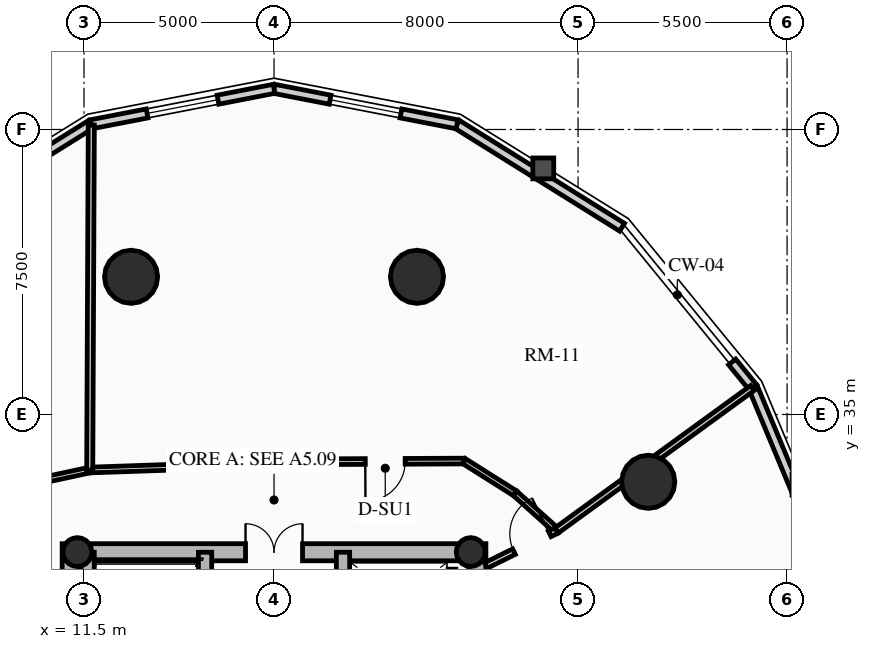
"""IFC4 building model, lengths in metres.
Left out: names, types, materials, properties, quantities, classifications, styles, units other than length and angle.
Written with IfcOpenShell. Run it as: python <this file> out.ifc"""

import sys

from ifc_helpers import new_model, si_unit, direction, frame, frame_2d, origin, origin_2d, place, context, subcontext, project, spatial, rectangle, circle, hollow_circle, extrude, source, transform, mapped, element, fill, save


model = new_model("IFC4")
c1 = context("Model", 3, precision=1e-05, world=origin(), true_north=direction((0.0, 1.0)))
c2 = subcontext(c1, "Body", "Model", "MODEL_VIEW")
j1 = project(units=[si_unit("LENGTHUNIT", "METRE"), si_unit("PLANEANGLEUNIT", "RADIAN")], contexts=[c1])
p1 = place(None, origin())
s1 = spatial("IfcSite", under=j1, at=p1, CompositionType="ELEMENT")
p2 = place(p1, origin())
s2 = spatial("IfcBuilding", under=s1, at=p2, CompositionType="ELEMENT")
p3 = place(p2, frame((0.0, 0.0, 132.88)))
s3 = spatial("IfcBuildingStorey", under=s2, at=p3, CompositionType="ELEMENT", Elevation=132.88)
for number, where, z_axis, x_axis in (
    (1, (11.15, 17.4, 0.0), (0.0, 0.0, 1.0), (0.0, 1.0, 0.0)),
    (2, (21.85, 17.4, 0.0), (0.0, 0.0, 1.0), (0.0, 1.0, 0.0)),
):
    element("IfcWall", number, at=place(p3, frame(where, z_axis=z_axis, x_axis=x_axis)), inside=s3, PredefinedType="SHEAR", context=c2, shape_type="SweptSolid", body=[
        extrude(rectangle(XDim=14.2, YDim=0.45, at=frame_2d((7.1, 0.0))), origin(), (0.0, 0.0, 1.0), 3.72),
    ])
p4 = place(p3, frame((11.15, 31.375, 0.0), z_axis=(0.0, 0.0, 1.0), x_axis=(1.0, 0.0, 0.0)))
e3 = element("IfcWall", 3, at=p4, inside=s3, PredefinedType="SHEAR", context=c2, shape_type="SweptSolid", body=[
    extrude(rectangle(XDim=10.7, YDim=0.45, at=frame_2d((5.35, 0.0))), origin(), (0.0, 0.0, 1.0), 3.72),
])
m1 = source(origin(), c2, "Body", "SweptSolid", [
    extrude(rectangle(XDim=1.5, YDim=2.02, at=frame_2d((0.75, 1.01))), frame((0.0, 0.235, 0.0), z_axis=(0.0, -1.0, 0.0), x_axis=(1.0, 0.0, 0.0)), (0.0, 0.0, 1.0), 0.47),
])
p5 = place(p4, frame((4.6, 0.0, 0.0)))
e4 = element("IfcOpeningElement", 4, at=p5, cuts=e3, PredefinedType="OPENING", context=c2, shape_type="MappedRepresentation", body=[
    mapped(m1, transform((0.0, 0.0, 0.0), x_axis=(1.0, 0.0, 0.0), y_axis=(0.0, 1.0, 0.0), z_axis=(0.0, 0.0, 1.0), scale=1.0)),
])
p6 = place(p3, frame((14.685, 17.625, 0.0), z_axis=(0.0, 0.0, 1.0), x_axis=(0.0, 1.0, 0.0)))
e5 = element("IfcWall", 5, at=p6, inside=s3, PredefinedType="SHEAR", context=c2, shape_type="SweptSolid", body=[
    extrude(rectangle(XDim=13.75, YDim=0.35, at=frame_2d((6.875, 0.0))), origin(), (0.0, 0.0, 1.0), 3.72),
])
m2 = source(origin(), c2, "Body", "SweptSolid", [
    extrude(rectangle(XDim=1.1, YDim=2.015, at=frame_2d((0.55, 1.007))), frame((0.0, 0.185, 0.0), z_axis=(0.0, -1.0, 0.0), x_axis=(1.0, 0.0, 0.0)), (0.0, 0.0, 1.0), 0.37),
])
p7 = place(p6, frame((4.875, 0.0, 0.0)))
e6 = element("IfcOpeningElement", 6, at=p7, cuts=e5, PredefinedType="OPENING", context=c2, shape_type="MappedRepresentation", body=[
    mapped(m2, transform((0.0, 0.0, 0.0), x_axis=(1.0, 0.0, 0.0), y_axis=(0.0, 1.0, 0.0), z_axis=(0.0, 0.0, 1.0), scale=1.0)),
])
p8 = place(p6, frame((0.65, 0.0, 0.0)))
e7 = element("IfcOpeningElement", 7, at=p8, cuts=e5, PredefinedType="OPENING", context=c2, shape_type="MappedRepresentation", body=[
    mapped(m2, transform((0.0, 0.0, 0.0), x_axis=(1.0, 0.0, 0.0), y_axis=(0.0, 1.0, 0.0), z_axis=(0.0, 0.0, 1.0), scale=1.0)),
])
p9 = place(p6, frame((2.65, 0.0, 0.0)))
e8 = element("IfcOpeningElement", 8, at=p9, cuts=e5, PredefinedType="OPENING", context=c2, shape_type="MappedRepresentation", body=[
    mapped(m2, transform((0.0, 0.0, 0.0), x_axis=(1.0, 0.0, 0.0), y_axis=(0.0, 1.0, 0.0), z_axis=(0.0, 0.0, 1.0), scale=1.0)),
])
m3 = source(origin(), c2, "Body", "SweptSolid", [
    extrude(rectangle(XDim=1.15, YDim=2.02, at=frame_2d((0.575, 1.01))), frame((0.0, 0.185, 0.0), z_axis=(0.0, -1.0, 0.0), x_axis=(1.0, 0.0, 0.0)), (0.0, 0.0, 1.0), 0.37),
])
p10 = place(p6, frame((7.295, 0.0, 0.0)))
e9 = element("IfcOpeningElement", 9, at=p10, cuts=e5, PredefinedType="OPENING", context=c2, shape_type="MappedRepresentation", body=[
    mapped(m3, transform((0.0, 0.0, 0.0), x_axis=(1.0, 0.0, 0.0), y_axis=(0.0, 1.0, 0.0), z_axis=(0.0, 0.0, 1.0), scale=1.0)),
])
p11 = place(p3, frame((18.315, 17.625, 0.0), z_axis=(0.0, 0.0, 1.0), x_axis=(0.0, 1.0, 0.0)))
e10 = element("IfcWall", 10, at=p11, inside=s3, PredefinedType="SHEAR", context=c2, shape_type="SweptSolid", body=[
    extrude(rectangle(XDim=13.75, YDim=0.35, at=frame_2d((6.875, 0.0))), origin(), (0.0, 0.0, 1.0), 3.72),
])
p12 = place(p11, frame((5.305, 0.0, 0.0)))
e11 = element("IfcOpeningElement", 11, at=p12, cuts=e10, PredefinedType="OPENING", context=c2, shape_type="MappedRepresentation", body=[
    mapped(m3, transform((0.0, 0.0, 0.0), x_axis=(1.0, 0.0, 0.0), y_axis=(0.0, 1.0, 0.0), z_axis=(0.0, 0.0, 1.0), scale=1.0)),
])
p13 = place(p3, frame((11.595, 24.655, 0.0), z_axis=(0.0, 0.0, 1.0), x_axis=(0.0, 1.0, 0.0)))
e12 = element("IfcWall", 12, at=p13, inside=s3, PredefinedType="SHEAR", context=c2, shape_type="SweptSolid", body=[
    extrude(rectangle(XDim=6.72, YDim=0.35, at=frame_2d((3.36, 0.0))), origin(), (0.0, 0.0, 1.0), 3.72),
])
for number, where, z_axis, x_axis in (
    (13, (11.325, 31.38, 0.0), (0.0, 0.0, 1.0), (1.0, 0.0, 0.0)),
    (14, (21.675, 31.38, 0.0), (0.0, 0.0, 1.0), (1.0, 0.0, 0.0)),
):
    element("IfcColumn", number, at=place(p3, frame(where, z_axis=z_axis, x_axis=x_axis)), inside=s3, PredefinedType="COLUMN", context=c2, shape_type="SweptSolid", body=[
        extrude(hollow_circle(Radius=0.38, WallThickness=0.032, at=origin_2d()), origin(), (0.0, 0.0, 1.0), 3.72),
    ])
for number, where, z_axis, x_axis in (
    (15, (26.347, 33.229, 0.0), (0.0, 0.0, 1.0), (1.0, 0.0, 0.0)),
    (16, (20.261, 38.623, 0.0), (0.0, 0.0, 1.0), (1.0, 0.0, 0.0)),
    (17, (12.739, 38.623, 0.0), (0.0, 0.0, 1.0), (1.0, 0.0, 0.0)),
):
    element("IfcColumn", number, at=place(p3, frame(where, z_axis=z_axis, x_axis=x_axis)), inside=s3, PredefinedType="USERDEFINED", context=c2, shape_type="SweptSolid", body=[
        extrude(circle(Radius=0.7, at=origin_2d()), origin(), (0.0, 0.0, 1.0), 3.72),
    ])
p14 = place(p3, frame((29.105, 35.709, 0.0), z_axis=(0.0, 0.0, 1.0), x_axis=(0.384344417632, -0.923189779317, 0.0)))
e18 = element("IfcWall", 18, at=p14, inside=s3, PredefinedType="SOLIDWALL", context=c2, shape_type="SweptSolid", body=[
    extrude(rectangle(XDim=5.758, YDim=0.24, at=frame_2d((2.879, 0.0))), origin(), (0.0, 0.0, 1.0), 2.949),
])
p15 = place(p3, frame((28.555, 36.383, 0.0), z_axis=(0.0, 0.0, 1.0), x_axis=(0.632702874536, -0.774394649099, 0.0)))
e19 = element("IfcWall", 19, at=p15, inside=s3, PredefinedType="SOLIDWALL", context=c2, shape_type="SweptSolid", body=[
    extrude(rectangle(XDim=0.87, YDim=0.24, at=frame_2d((0.435, 0.0))), origin(), (0.0, 0.0, 1.0), 2.949),
])
p16 = place(p3, frame((21.315, 42.637, 0.0), z_axis=(0.0, 0.0, 1.0), x_axis=(0.848520380187, -0.529162701263, 0.0)))
e20 = element("IfcWall", 20, at=p16, inside=s3, PredefinedType="SOLIDWALL", context=c2, shape_type="SweptSolid", body=[
    extrude(rectangle(XDim=5.119, YDim=0.24, at=frame_2d((2.56, 0.0))), origin(), (0.0, 0.0, 1.0), 2.949),
])
p17 = place(p3, frame((16.5, 43.57, 0.0), z_axis=(0.0, 0.0, 1.0), x_axis=(0.981723785992, -0.190311344954, 0.0)))
e21 = element("IfcWall", 21, at=p17, inside=s3, PredefinedType="SOLIDWALL", context=c2, shape_type="SweptSolid", body=[
    extrude(rectangle(XDim=4.904, YDim=0.24, at=frame_2d((2.452, 0.0))), origin(), (0.0, 0.0, 1.0), 2.949),
])
m4 = source(origin(), c2, "Body", "SweptSolid", [
    extrude(rectangle(XDim=1.9, YDim=1.35, at=frame_2d((0.95, 0.675))), frame((0.0, 0.13, 0.0), z_axis=(0.0, -1.0, 0.0), x_axis=(1.0, 0.0, 0.0)), (0.0, 0.0, 1.0), 0.26),
])
p18 = place(p17, frame((1.502, 0.0, 0.65)))
e22 = element("IfcOpeningElement", 22, at=p18, cuts=e21, PredefinedType="OPENING", context=c2, shape_type="MappedRepresentation", body=[
    mapped(m4, transform((0.0, 0.0, 0.0), x_axis=(1.0, 0.0, 0.0), y_axis=(0.0, 1.0, 0.0), z_axis=(0.0, 0.0, 1.0), scale=1.0)),
])
p19 = place(p3, frame((11.685, 42.637, 0.0), z_axis=(0.0, 0.0, 1.0), x_axis=(0.981723785992, 0.190311344954, 0.0)))
e23 = element("IfcWall", 23, at=p19, inside=s3, PredefinedType="SOLIDWALL", context=c2, shape_type="SweptSolid", body=[
    extrude(rectangle(XDim=4.904, YDim=0.24, at=frame_2d((2.452, 0.0))), origin(), (0.0, 0.0, 1.0), 2.949),
])
p20 = place(p19, frame((1.502, 0.0, 0.65)))
e24 = element("IfcOpeningElement", 24, at=p20, cuts=e23, PredefinedType="OPENING", context=c2, shape_type="MappedRepresentation", body=[
    mapped(m4, transform((0.0, 0.0, 0.0), x_axis=(1.0, 0.0, 0.0), y_axis=(0.0, 1.0, 0.0), z_axis=(0.0, 0.0, 1.0), scale=1.0)),
])
p21 = place(p3, frame((7.342, 39.928, 0.0), z_axis=(0.0, 0.0, 1.0), x_axis=(0.848520380187, 0.529162701263, 0.0)))
e25 = element("IfcWall", 25, at=p21, inside=s3, PredefinedType="SOLIDWALL", context=c2, shape_type="SweptSolid", body=[
    extrude(rectangle(XDim=5.119, YDim=0.24, at=frame_2d((2.56, 0.0))), origin(), (0.0, 0.0, 1.0), 2.949),
])
p22 = place(p3, frame((23.933, 31.946, 0.0), z_axis=(0.0, 0.0, 1.0), x_axis=(-0.744529651383, 0.667589393423, 0.0)))
e26 = element("IfcWall", 26, at=p22, inside=s3, PredefinedType="PARTITIONING", context=c2, shape_type="SweptSolid", body=[
    extrude(rectangle(XDim=1.472, YDim=0.15, at=frame_2d((0.736, 0.0))), origin(), (0.0, 0.0, 1.0), 2.995),
])
p23 = place(p3, frame((22.837, 32.929, 0.0), z_axis=(0.0, 0.0, 1.0), x_axis=(-0.84581079329, 0.533482991252, 0.0)))
e27 = element("IfcWall", 27, at=p23, inside=s3, PredefinedType="PARTITIONING", context=c2, shape_type="SweptSolid", body=[
    extrude(rectangle(XDim=1.585, YDim=0.15, at=frame_2d((0.792, 0.0))), origin(), (0.0, 0.0, 1.0), 2.995),
])
p24 = place(p3, frame((21.496, 33.775, 0.0), z_axis=(0.0, 0.0, 1.0), x_axis=(-0.999989544737, -0.004572790979, 0.0)))
e28 = element("IfcWall", 28, at=p24, inside=s3, PredefinedType="PARTITIONING", context=c2, shape_type="SweptSolid", body=[
    extrude(rectangle(XDim=3.364, YDim=0.15, at=frame_2d((1.682, 0.0))), origin(), (0.0, 0.0, 1.0), 2.995),
])
m5 = source(origin(), c2, "Body", "SweptSolid", [
    extrude(rectangle(XDim=1.05, YDim=2.015, at=frame_2d((0.525, 1.007))), frame((0.0, 0.085, 0.0), z_axis=(0.0, -1.0, 0.0), x_axis=(1.0, 0.0, 0.0)), (0.0, 0.0, 1.0), 0.17),
])
p25 = place(p24, frame((1.546, 0.0, 0.0)))
e29 = element("IfcOpeningElement", 29, at=p25, cuts=e28, PredefinedType="OPENING", context=c2, shape_type="MappedRepresentation", body=[
    mapped(m5, transform((0.0, 0.0, 0.0), x_axis=(1.0, 0.0, 0.0), y_axis=(0.0, 1.0, 0.0), z_axis=(0.0, 0.0, 1.0), scale=1.0)),
])
p26 = place(p3, frame((18.133, 33.76, 0.0), z_axis=(0.0, 0.0, 1.0), x_axis=(-0.999419643988, -0.034064280574, 0.0)))
e30 = element("IfcWall", 30, at=p26, inside=s3, PredefinedType="PARTITIONING", context=c2, shape_type="SweptSolid", body=[
    extrude(rectangle(XDim=6.486, YDim=0.15, at=frame_2d((3.243, 0.0))), origin(), (0.0, 0.0, 1.0), 2.995),
])
p27 = place(p3, frame((11.65, 33.539, 0.0), z_axis=(0.0, 0.0, 1.0), x_axis=(-0.977535921581, -0.210768882949, 0.0)))
e31 = element("IfcWall", 31, at=p27, inside=s3, PredefinedType="PARTITIONING", context=c2, shape_type="SweptSolid", body=[
    extrude(rectangle(XDim=1.923, YDim=0.15, at=frame_2d((0.961, 0.0))), origin(), (0.0, 0.0, 1.0), 2.995),
])
p28 = place(p3, frame((23.933, 31.946, 0.0), z_axis=(0.0, 0.0, 1.0), x_axis=(0.808636722237, 0.588308296261, 0.0)))
e32 = element("IfcWall", 32, at=p28, inside=s3, PredefinedType="PARTITIONING", context=c2, shape_type="SweptSolid", body=[
    extrude(rectangle(XDim=6.376, YDim=0.16, at=frame_2d((3.188, 0.0))), origin(), (0.0, 0.0, 1.0), 2.949),
])
p29 = place(p3, frame((11.65, 33.539, 0.0), z_axis=(0.0, 0.0, 1.0), x_axis=(0.00451754022, 0.999989795863, 0.0)))
e33 = element("IfcWall", 33, at=p29, inside=s3, PredefinedType="PARTITIONING", context=c2, shape_type="SweptSolid", body=[
    extrude(rectangle(XDim=9.079, YDim=0.16, at=frame_2d((4.54, 0.0))), origin(), (0.0, 0.0, 1.0), 2.949),
])
p30 = place(p3, frame((22.075, 31.025, 0.0), z_axis=(0.0, 0.0, 1.0), x_axis=(0.8959286695, 0.444197950432, 0.0)))
e34 = element("IfcWall", 34, at=p30, inside=s3, PredefinedType="PARTITIONING", context=c2, shape_type="SweptSolid", body=[
    extrude(rectangle(XDim=2.074, YDim=0.16, at=frame_2d((1.037, 0.0))), origin(), (0.0, 0.0, 1.0), 2.995),
])
m6 = source(origin(), c2, "Body", "SweptSolid", [
    extrude(rectangle(XDim=1.05, YDim=2.015, at=frame_2d((0.525, 1.007))), frame((0.0, 0.09, 0.0), z_axis=(0.0, -1.0, 0.0), x_axis=(1.0, 0.0, 0.0)), (0.0, 0.0, 1.0), 0.18),
])
p31 = place(p30, frame((0.824, 0.0, 0.0)))
e35 = element("IfcOpeningElement", 35, at=p31, cuts=e34, PredefinedType="OPENING", context=c2, shape_type="MappedRepresentation", body=[
    mapped(m6, transform((0.0, 0.0, 0.0), x_axis=(1.0, 0.0, 0.0), y_axis=(0.0, 1.0, 0.0), z_axis=(0.0, 0.0, 1.0), scale=1.0)),
])
m7 = source(origin(), c2, "Body", "SweptSolid", [
    extrude(rectangle(XDim=1.9, YDim=1.35, at=frame_2d((0.95, 0.675))), frame((0.0, 0.03, 0.0), z_axis=(0.0, -1.0, 0.0), x_axis=(1.0, 0.0, 0.0)), (0.0, 0.0, 1.0), 0.06),
])
p32 = place(p18, origin())
e36 = element("IfcWindow", 36, at=p32, inside=s3, PartitioningType="DOUBLE_PANEL_VERTICAL", PredefinedType="WINDOW", context=c2, shape_type="MappedRepresentation", body=[
    mapped(m7, transform((0.0, 0.0, 0.0), x_axis=(1.0, 0.0, 0.0), y_axis=(0.0, 1.0, 0.0), z_axis=(0.0, 0.0, 1.0), scale=1.0)),
])
fill(e22, e36)
p33 = place(p20, origin())
e37 = element("IfcWindow", 37, at=p33, inside=s3, PartitioningType="DOUBLE_PANEL_VERTICAL", PredefinedType="WINDOW", context=c2, shape_type="MappedRepresentation", body=[
    mapped(m7, transform((0.0, 0.0, 0.0), x_axis=(1.0, 0.0, 0.0), y_axis=(0.0, 1.0, 0.0), z_axis=(0.0, 0.0, 1.0), scale=1.0)),
])
fill(e24, e37)
m8 = source(origin(), c2, "Body", "SweptSolid", [
    extrude(rectangle(XDim=1.5, YDim=2.02, at=frame_2d((0.75, 1.01))), frame((0.0, 0.025, 0.0), z_axis=(0.0, -1.0, 0.0), x_axis=(1.0, 0.0, 0.0)), (0.0, 0.0, 1.0), 0.05),
])
p34 = place(p5, origin())
e38 = element("IfcDoor", 38, at=p34, inside=s3, OperationType="DOUBLE_DOOR_SINGLE_SWING", PredefinedType="DOOR", context=c2, shape_type="MappedRepresentation", body=[
    mapped(m8, transform((0.0, 0.0, 0.0), x_axis=(1.0, 0.0, 0.0), y_axis=(0.0, 1.0, 0.0), z_axis=(0.0, 0.0, 1.0), scale=1.0)),
])
fill(e4, e38)
m9 = source(origin(), c2, "Body", "SweptSolid", [
    extrude(rectangle(XDim=1.05, YDim=2.015, at=frame_2d((0.525, 1.007))), frame((0.0, 0.025, 0.0), z_axis=(0.0, -1.0, 0.0), x_axis=(1.0, 0.0, 0.0)), (0.0, 0.0, 1.0), 0.05),
])
p35 = place(p31, origin())
e39 = element("IfcDoor", 39, at=p35, inside=s3, OperationType="SINGLE_SWING_RIGHT", PredefinedType="DOOR", context=c2, shape_type="MappedRepresentation", body=[
    mapped(m9, transform((0.0, 0.0, 0.0), x_axis=(1.0, 0.0, 0.0), y_axis=(0.0, 1.0, 0.0), z_axis=(0.0, 0.0, 1.0), scale=1.0)),
])
fill(e35, e39)
p36 = place(p25, origin())
e40 = element("IfcDoor", 40, at=p36, inside=s3, OperationType="SINGLE_SWING_RIGHT", PredefinedType="DOOR", context=c2, shape_type="MappedRepresentation", body=[
    mapped(m9, transform((0.0, 0.0, 0.0), x_axis=(1.0, 0.0, 0.0), y_axis=(0.0, 1.0, 0.0), z_axis=(0.0, 0.0, 1.0), scale=1.0)),
])
fill(e29, e40)
save(model, sys.argv[1])
